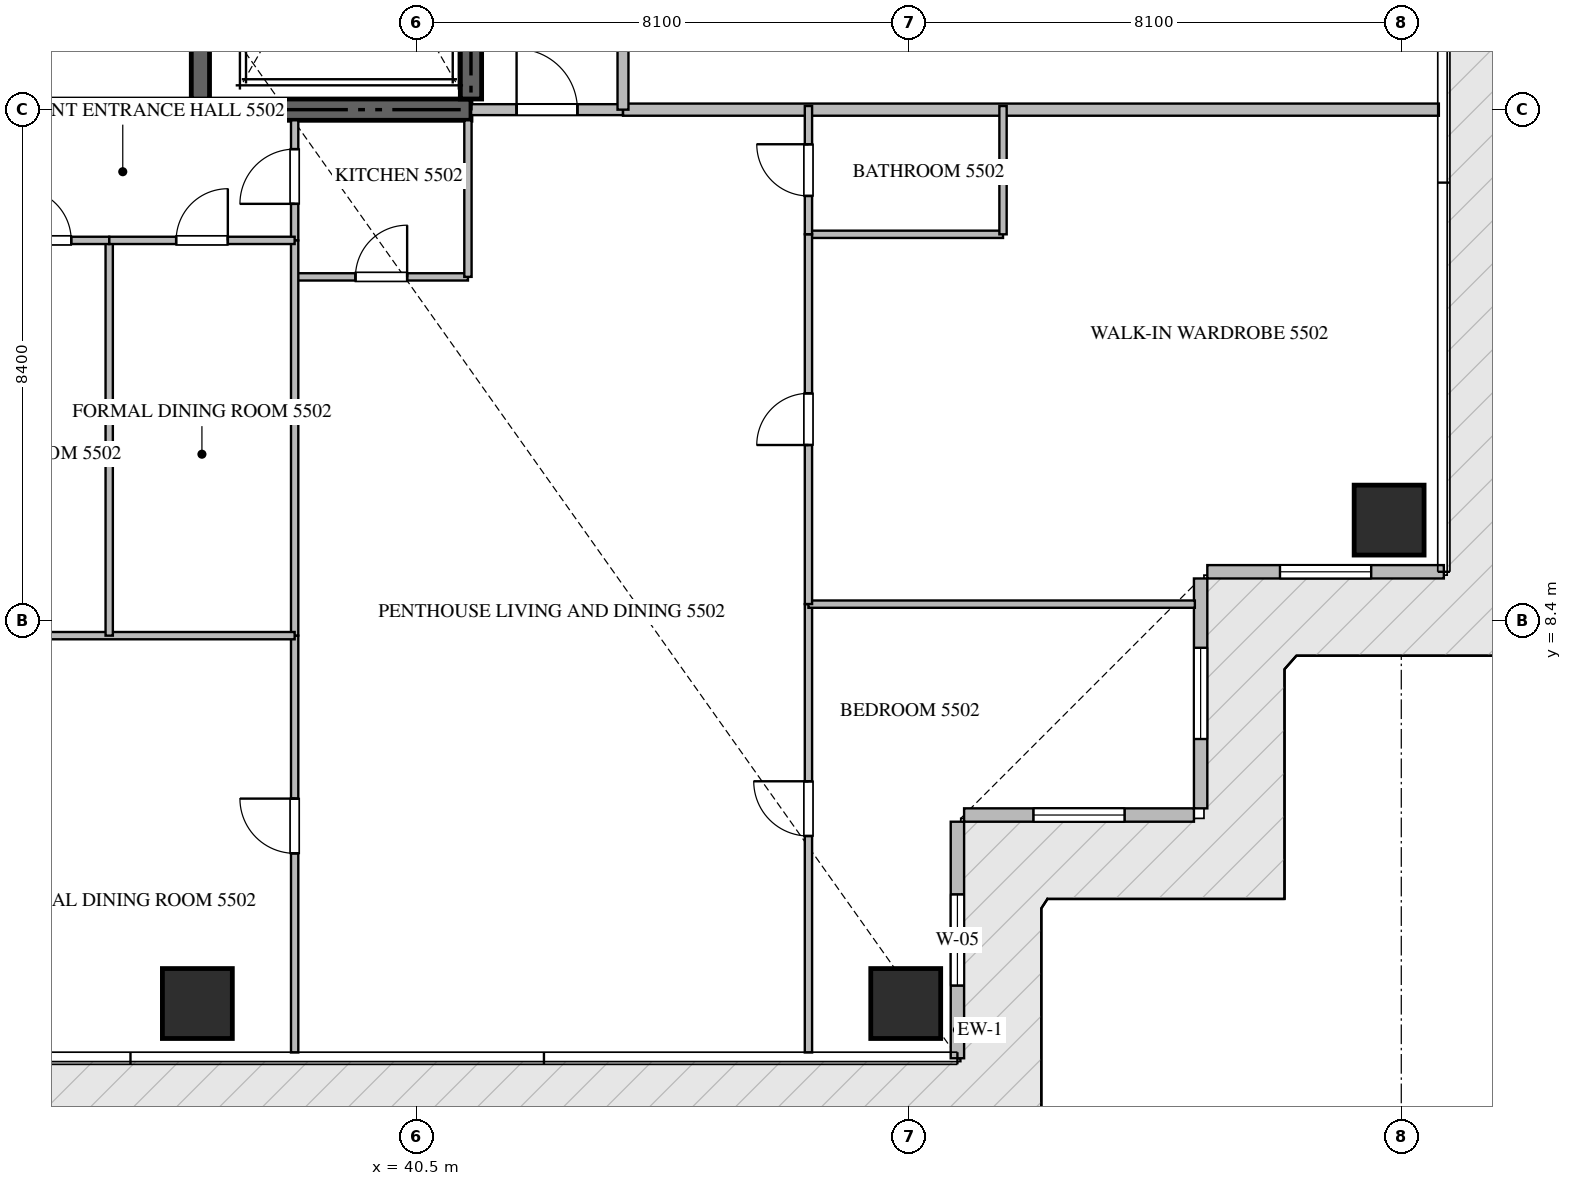
"""IFC4 building model, lengths in metres.
Left out: names, types, materials, properties, quantities, classifications, styles, units other than length and angle.
Written with IfcOpenShell. Run it as: python <this file> out.ifc"""

import sys

from ifc_helpers import new_model, si_unit, direction, frame, frame_2d, origin, origin_2d, place, context, subcontext, project, spatial, rectangle, extrude, source, transform, mapped, element, fill, save


model = new_model("IFC4")
c1 = context("Model", 3, precision=1e-05, world=origin(), true_north=direction((0.0, 1.0)))
c2 = subcontext(c1, "Body", "Model", "MODEL_VIEW")
j1 = project(units=[si_unit("LENGTHUNIT", "METRE"), si_unit("PLANEANGLEUNIT", "RADIAN")], contexts=[c1])
p1 = place(None, origin())
s1 = spatial("IfcSite", under=j1, at=p1, CompositionType="ELEMENT")
p2 = place(p1, origin())
s2 = spatial("IfcBuilding", under=s1, at=p2, CompositionType="ELEMENT")
p3 = place(p2, frame((0.0, 0.0, 222.0)))
s3 = spatial("IfcBuildingStorey", under=s2, at=p3, CompositionType="ELEMENT", Elevation=222.0)
p4 = place(p3, frame((23.4, 16.8, -0.26), z_axis=(0.0, 0.0, 1.0), x_axis=(1.0, 0.0, 0.0)))
e1 = element("IfcWall", 1, at=p4, inside=s3, PredefinedType="SHEAR", context=c2, shape_type="SweptSolid", body=[
    extrude(rectangle(XDim=18.0, YDim=0.35, at=frame_2d((9.0, 0.0))), origin(), (0.0, 0.0, 1.0), 3.848),
])
p5 = place(p3, frame((41.4, 16.975, -0.26), z_axis=(0.0, 0.0, 1.0), x_axis=(0.0, 1.0, 0.0)))
e2 = element("IfcWall", 2, at=p5, inside=s3, PredefinedType="SHEAR", context=c2, shape_type="SweptSolid", body=[
    extrude(rectangle(XDim=8.375, YDim=0.35, at=frame_2d((4.188, 0.0))), origin(), (0.0, 0.0, 1.0), 3.848),
])
p6 = place(p3, frame((36.95, 16.975, -0.26), z_axis=(0.0, 0.0, 1.0), x_axis=(0.0, 1.0, 0.0)))
e3 = element("IfcWall", 3, at=p6, inside=s3, PredefinedType="SHEAR", context=c2, shape_type="SweptSolid", body=[
    extrude(rectangle(XDim=8.375, YDim=0.3, at=frame_2d((4.188, 0.0))), origin(), (0.0, 0.0, 1.0), 3.848),
])
m1 = source(origin(), c2, "Body", "SweptSolid", [
    extrude(rectangle(XDim=1.15, YDim=1.15, at=origin_2d()), origin(), (0.0, 0.0, 1.0), 3.85),
])
for number, where, z_axis, x_axis in (
    (4, (36.9, 2.1, -0.26), (0.0, 0.0, 1.0), (1.0, 0.0, 0.0)),
    (5, (48.55, 2.1, -0.26), (0.0, 0.0, 1.0), (1.0, 0.0, 0.0)),
    (6, (56.5, 10.05, -0.26), (0.0, 0.0, 1.0), (1.0, 0.0, 0.0)),
):
    element("IfcColumn", number, at=place(p3, frame(where, z_axis=z_axis, x_axis=x_axis)), inside=s3, PredefinedType="COLUMN", context=c2, shape_type="MappedRepresentation", body=[
        mapped(m1, transform((0.0, 0.0, 0.0), scale=1.0)),
    ])
p7 = place(p3, frame((49.4, 1.2, 0.0), z_axis=(0.0, 0.0, 1.0), x_axis=(0.0, 1.0, 0.0)))
e7 = element("IfcWall", 7, at=p7, inside=s3, PredefinedType="ELEMENTEDWALL", context=c2, shape_type="SweptSolid", body=[
    extrude(rectangle(XDim=3.89, YDim=0.22, at=frame_2d((1.945, 0.0))), origin(), (0.0, 0.0, 1.0), 3.575),
])
p8 = place(p7, frame((1.195, 0.0, 0.65)))
e8 = element("IfcOpeningElement", 8, at=p8, cuts=e7, PredefinedType="OPENING", context=c2, shape_type="SweptSolid", body=[
    extrude(rectangle(XDim=1.5, YDim=2.25, at=frame_2d((0.75, 1.125))), frame((0.0, 0.12, 0.0), z_axis=(0.0, -1.0, 0.0), x_axis=(1.0, 0.0, 0.0)), (0.0, 0.0, 1.0), 0.24),
])
p9 = place(p3, frame((49.51, 5.2, 0.0), z_axis=(0.0, 0.0, 1.0), x_axis=(1.0, 0.0, 0.0)))
e9 = element("IfcWall", 9, at=p9, inside=s3, PredefinedType="ELEMENTEDWALL", context=c2, shape_type="SweptSolid", body=[
    extrude(rectangle(XDim=3.78, YDim=0.22, at=frame_2d((1.89, 0.0))), origin(), (0.0, 0.0, 1.0), 3.575),
])
p10 = place(p9, frame((1.14, 0.0, 0.65)))
e10 = element("IfcOpeningElement", 10, at=p10, cuts=e9, PredefinedType="OPENING", context=c2, shape_type="SweptSolid", body=[
    extrude(rectangle(XDim=1.5, YDim=2.25, at=frame_2d((0.75, 1.125))), frame((0.0, 0.12, 0.0), z_axis=(0.0, -1.0, 0.0), x_axis=(1.0, 0.0, 0.0)), (0.0, 0.0, 1.0), 0.24),
])
p11 = place(p3, frame((53.4, 5.31, 0.0), z_axis=(0.0, 0.0, 1.0), x_axis=(0.0, 1.0, 0.0)))
e11 = element("IfcWall", 11, at=p11, inside=s3, PredefinedType="ELEMENTEDWALL", context=c2, shape_type="SweptSolid", body=[
    extrude(rectangle(XDim=3.78, YDim=0.22, at=frame_2d((1.89, 0.0))), origin(), (0.0, 0.0, 1.0), 3.575),
])
p12 = place(p11, frame((1.14, 0.0, 0.65)))
e12 = element("IfcOpeningElement", 12, at=p12, cuts=e11, PredefinedType="OPENING", context=c2, shape_type="SweptSolid", body=[
    extrude(rectangle(XDim=1.5, YDim=2.25, at=frame_2d((0.75, 1.125))), frame((0.0, 0.12, 0.0), z_axis=(0.0, -1.0, 0.0), x_axis=(1.0, 0.0, 0.0)), (0.0, 0.0, 1.0), 0.24),
])
p13 = place(p3, frame((53.51, 9.2, 0.0), z_axis=(0.0, 0.0, 1.0), x_axis=(1.0, 0.0, 0.0)))
e13 = element("IfcWall", 13, at=p13, inside=s3, PredefinedType="ELEMENTEDWALL", context=c2, shape_type="SweptSolid", body=[
    extrude(rectangle(XDim=3.89, YDim=0.22, at=frame_2d((1.945, 0.0))), origin(), (0.0, 0.0, 1.0), 3.575),
])
p14 = place(p13, frame((1.195, 0.0, 0.65)))
e14 = element("IfcOpeningElement", 14, at=p14, cuts=e13, PredefinedType="OPENING", context=c2, shape_type="SweptSolid", body=[
    extrude(rectangle(XDim=1.5, YDim=2.25, at=frame_2d((0.75, 1.125))), frame((0.0, 0.12, 0.0), z_axis=(0.0, -1.0, 0.0), x_axis=(1.0, 0.0, 0.0)), (0.0, 0.0, 1.0), 0.24),
])
p15 = place(p3, frame((43.9, 16.8, 0.0), z_axis=(0.0, 0.0, 1.0), x_axis=(1.0, 0.0, 0.0)))
e15 = element("IfcWall", 15, at=p15, inside=s3, PredefinedType="PARTITIONING", context=c2, shape_type="SweptSolid", body=[
    extrude(rectangle(XDim=13.418, YDim=0.2, at=frame_2d((6.709, 0.0))), origin(), (0.0, 0.0, 1.0), 3.59),
])
p16 = place(p3, frame((41.402, 16.8, 0.0), z_axis=(0.0, 0.0, 1.0), x_axis=(1.0, 0.0, 0.0)))
e16 = element("IfcWall", 16, at=p16, inside=s3, PredefinedType="PARTITIONING", context=c2, shape_type="SweptSolid", body=[
    extrude(rectangle(XDim=2.496, YDim=0.18, at=frame_2d((1.248, 0.0))), origin(), (0.0, 0.0, 1.0), 3.59),
])
p17 = place(p16, frame((0.748, 0.0, 0.0)))
e17 = element("IfcOpeningElement", 17, at=p17, cuts=e16, PredefinedType="OPENING", context=c2, shape_type="SweptSolid", body=[
    extrude(rectangle(XDim=1.0, YDim=2.15, at=frame_2d((0.5, 1.075))), frame((0.0, 0.1, 0.0), z_axis=(0.0, -1.0, 0.0), x_axis=(1.0, 0.0, 0.0)), (0.0, 0.0, 1.0), 0.2),
])
p18 = place(p3, frame((43.9, 16.8, 0.0), z_axis=(0.0, 0.0, 1.0), x_axis=(0.0, 1.0, 0.0)))
e18 = element("IfcWall", 18, at=p18, inside=s3, PredefinedType="PARTITIONING", context=c2, shape_type="SweptSolid", body=[
    extrude(rectangle(XDim=16.8, YDim=0.18, at=frame_2d((8.4, 0.0))), origin(), (0.0, 0.0, 1.0), 3.59),
])
p19 = place(p18, frame((2.575, 0.0, 0.0)))
e19 = element("IfcOpeningElement", 19, at=p19, cuts=e18, PredefinedType="OPENING", context=c2, shape_type="SweptSolid", body=[
    extrude(rectangle(XDim=1.0, YDim=2.15, at=frame_2d((0.5, 1.075))), frame((0.0, 0.1, 0.0), z_axis=(0.0, -1.0, 0.0), x_axis=(1.0, 0.0, 0.0)), (0.0, 0.0, 1.0), 0.2),
])
p20 = place(p18, frame((10.997, 0.0, 0.0)))
e20 = element("IfcOpeningElement", 20, at=p20, cuts=e18, PredefinedType="OPENING", context=c2, shape_type="SweptSolid", body=[
    extrude(rectangle(XDim=1.0, YDim=2.15, at=frame_2d((0.5, 1.075))), frame((0.0, 0.1, 0.0), z_axis=(0.0, -1.0, 0.0), x_axis=(1.0, 0.0, 0.0)), (0.0, 0.0, 1.0), 0.2),
])
p21 = place(p3, frame((38.5, 14.05, 0.0), z_axis=(0.0, 0.0, 1.0), x_axis=(1.0, 0.0, 0.0)))
e21 = element("IfcWall", 21, at=p21, inside=s3, PredefinedType="PARTITIONING", context=c2, shape_type="SweptSolid", body=[
    extrude(rectangle(XDim=2.85, YDim=0.12, at=frame_2d((1.425, 0.0))), origin(), (0.0, 0.0, 1.0), 3.59),
])
p22 = place(p21, frame((1.0, 0.0, 0.0)))
e22 = element("IfcOpeningElement", 22, at=p22, cuts=e21, PredefinedType="OPENING", context=c2, shape_type="SweptSolid", body=[
    extrude(rectangle(XDim=0.85, YDim=2.1, at=frame_2d((0.425, 1.05))), frame((0.0, 0.07, 0.0), z_axis=(0.0, -1.0, 0.0), x_axis=(1.0, 0.0, 0.0)), (0.0, 0.0, 1.0), 0.14),
])
p23 = place(p3, frame((41.35, 14.05, 0.0), z_axis=(0.0, 0.0, 1.0), x_axis=(0.0, 1.0, 0.0)))
e23 = element("IfcWall", 23, at=p23, inside=s3, PredefinedType="PARTITIONING", context=c2, shape_type="SweptSolid", body=[
    extrude(rectangle(XDim=2.575, YDim=0.12, at=frame_2d((1.288, 0.0))), origin(), (0.0, 0.0, 1.0), 3.59),
])
p24 = place(p3, frame((38.5, 14.65, 0.0), z_axis=(0.0, 0.0, 1.0), x_axis=(0.0, 1.0, 0.0)))
e24 = element("IfcWall", 24, at=p24, inside=s3, PredefinedType="PARTITIONING", context=c2, shape_type="SweptSolid", body=[
    extrude(rectangle(XDim=1.975, YDim=0.12, at=frame_2d((0.988, 0.0))), origin(), (0.0, 0.0, 1.0), 3.59),
])
p25 = place(p24, frame((0.601, 0.0, 0.0)))
e25 = element("IfcOpeningElement", 25, at=p25, cuts=e24, PredefinedType="OPENING", context=c2, shape_type="SweptSolid", body=[
    extrude(rectangle(XDim=0.9, YDim=2.1, at=frame_2d((0.45, 1.05))), frame((0.0, 0.07, 0.0), z_axis=(0.0, -1.0, 0.0), x_axis=(1.0, 0.0, 0.0)), (0.0, 0.0, 1.0), 0.14),
])
p26 = place(p3, frame((38.5, 1.295, 0.0), z_axis=(0.0, 0.0, 1.0), x_axis=(0.0, 1.0, 0.0)))
e26 = element("IfcWall", 26, at=p26, inside=s3, PredefinedType="PARTITIONING", context=c2, shape_type="SweptSolid", body=[
    extrude(rectangle(XDim=6.855, YDim=0.12, at=frame_2d((3.427, 0.0))), origin(), (0.0, 0.0, 1.0), 3.59),
])
p27 = place(p26, frame((3.275, 0.0, 0.0)))
e27 = element("IfcOpeningElement", 27, at=p27, cuts=e26, PredefinedType="OPENING", context=c2, shape_type="SweptSolid", body=[
    extrude(rectangle(XDim=0.9, YDim=2.1, at=frame_2d((0.45, 1.05))), frame((0.0, 0.07, 0.0), z_axis=(0.0, -1.0, 0.0), x_axis=(1.0, 0.0, 0.0)), (0.0, 0.0, 1.0), 0.14),
])
p28 = place(p3, frame((38.5, 8.152, 0.0), z_axis=(0.0, 0.0, 1.0), x_axis=(0.0, 1.0, 0.0)))
e28 = element("IfcWall", 28, at=p28, inside=s3, PredefinedType="PARTITIONING", context=c2, shape_type="SweptSolid", body=[
    extrude(rectangle(XDim=6.496, YDim=0.12, at=frame_2d((3.248, 0.0))), origin(), (0.0, 0.0, 1.0), 3.59),
])
p29 = place(p3, frame((33.35, 8.15, 0.0), z_axis=(0.0, 0.0, 1.0), x_axis=(1.0, 0.0, 0.0)))
e29 = element("IfcWall", 29, at=p29, inside=s3, PredefinedType="PARTITIONING", context=c2, shape_type="SweptSolid", body=[
    extrude(rectangle(XDim=5.15, YDim=0.12, at=frame_2d((2.575, 0.0))), origin(), (0.0, 0.0, 1.0), 3.59),
])
p30 = place(p3, frame((35.45, 8.15, 0.0), z_axis=(0.0, 0.0, 1.0), x_axis=(0.0, 1.0, 0.0)))
e30 = element("IfcWall", 30, at=p30, inside=s3, PredefinedType="PARTITIONING", context=c2, shape_type="SweptSolid", body=[
    extrude(rectangle(XDim=6.5, YDim=0.12, at=frame_2d((3.25, 0.0))), origin(), (0.0, 0.0, 1.0), 3.59),
])
p31 = place(p3, frame((33.35, 14.65, 0.0), z_axis=(0.0, 0.0, 1.0), x_axis=(1.0, 0.0, 0.0)))
e31 = element("IfcWall", 31, at=p31, inside=s3, PredefinedType="PARTITIONING", context=c2, shape_type="SweptSolid", body=[
    extrude(rectangle(XDim=2.1, YDim=0.12, at=frame_2d((1.05, 0.0))), origin(), (0.0, 0.0, 1.0), 3.59),
])
p32 = place(p31, frame((0.625, 0.0, 0.0)))
e32 = element("IfcOpeningElement", 32, at=p32, cuts=e31, PredefinedType="OPENING", context=c2, shape_type="SweptSolid", body=[
    extrude(rectangle(XDim=0.85, YDim=2.1, at=frame_2d((0.425, 1.05))), frame((0.0, 0.07, 0.0), z_axis=(0.0, -1.0, 0.0), x_axis=(1.0, 0.0, 0.0)), (0.0, 0.0, 1.0), 0.14),
])
p33 = place(p3, frame((35.452, 14.65, 0.0), z_axis=(0.0, 0.0, 1.0), x_axis=(1.0, 0.0, 0.0)))
e33 = element("IfcWall", 33, at=p33, inside=s3, PredefinedType="PARTITIONING", context=c2, shape_type="SweptSolid", body=[
    extrude(rectangle(XDim=3.048, YDim=0.12, at=frame_2d((1.524, 0.0))), origin(), (0.0, 0.0, 1.0), 3.59),
])
p34 = place(p33, frame((1.099, 0.0, 0.0)))
e34 = element("IfcOpeningElement", 34, at=p34, cuts=e33, PredefinedType="OPENING", context=c2, shape_type="SweptSolid", body=[
    extrude(rectangle(XDim=0.85, YDim=2.1, at=frame_2d((0.425, 1.05))), frame((0.0, 0.07, 0.0), z_axis=(0.0, -1.0, 0.0), x_axis=(1.0, 0.0, 0.0)), (0.0, 0.0, 1.0), 0.14),
])
p35 = place(p3, frame((46.95, 1.295, 0.0), z_axis=(0.0, 0.0, 1.0), x_axis=(0.0, 1.0, 0.0)))
e35 = element("IfcWall", 35, at=p35, inside=s3, PredefinedType="PARTITIONING", context=c2, shape_type="SweptSolid", body=[
    extrude(rectangle(XDim=7.373, YDim=0.12, at=frame_2d((3.687, 0.0))), origin(), (0.0, 0.0, 1.0), 3.59),
])
p36 = place(p35, frame((3.56, 0.0, 0.0)))
e36 = element("IfcOpeningElement", 36, at=p36, cuts=e35, PredefinedType="OPENING", context=c2, shape_type="SweptSolid", body=[
    extrude(rectangle(XDim=0.9, YDim=2.1, at=frame_2d((0.45, 1.05))), frame((0.0, 0.07, 0.0), z_axis=(0.0, -1.0, 0.0), x_axis=(1.0, 0.0, 0.0)), (0.0, 0.0, 1.0), 0.14),
])
p37 = place(p3, frame((46.95, 8.668, 0.0), z_axis=(0.0, 0.0, 1.0), x_axis=(1.0, 0.0, 0.0)))
e37 = element("IfcWall", 37, at=p37, inside=s3, PredefinedType="PARTITIONING", context=c2, shape_type="SweptSolid", body=[
    extrude(rectangle(XDim=6.355, YDim=0.12, at=frame_2d((3.177, 0.0))), origin(), (0.0, 0.0, 1.0), 3.59),
])
p38 = place(p3, frame((46.95, 14.75, 0.0), z_axis=(0.0, 0.0, 1.0), x_axis=(1.0, 0.0, 0.0)))
e38 = element("IfcWall", 38, at=p38, inside=s3, PredefinedType="PARTITIONING", context=c2, shape_type="SweptSolid", body=[
    extrude(rectangle(XDim=3.2, YDim=0.12, at=frame_2d((1.6, 0.0))), origin(), (0.0, 0.0, 1.0), 3.59),
])
p39 = place(p3, frame((50.15, 14.75, 0.0), z_axis=(0.0, 0.0, 1.0), x_axis=(0.0, 1.0, 0.0)))
e39 = element("IfcWall", 39, at=p39, inside=s3, PredefinedType="PARTITIONING", context=c2, shape_type="SweptSolid", body=[
    extrude(rectangle(XDim=2.11, YDim=0.12, at=frame_2d((1.055, 0.0))), origin(), (0.0, 0.0, 1.0), 3.59),
])
p40 = place(p3, frame((46.95, 8.67, 0.0), z_axis=(0.0, 0.0, 1.0), x_axis=(0.0, 1.0, 0.0)))
e40 = element("IfcWall", 40, at=p40, inside=s3, PredefinedType="PARTITIONING", context=c2, shape_type="SweptSolid", body=[
    extrude(rectangle(XDim=6.08, YDim=0.12, at=frame_2d((3.04, 0.0))), origin(), (0.0, 0.0, 1.0), 3.59),
])
p41 = place(p40, frame((2.615, 0.0, 0.0)))
e41 = element("IfcOpeningElement", 41, at=p41, cuts=e40, PredefinedType="OPENING", context=c2, shape_type="SweptSolid", body=[
    extrude(rectangle(XDim=0.85, YDim=2.1, at=frame_2d((0.425, 1.05))), frame((0.0, 0.07, 0.0), z_axis=(0.0, -1.0, 0.0), x_axis=(1.0, 0.0, 0.0)), (0.0, 0.0, 1.0), 0.14),
])
p42 = place(p3, frame((46.95, 14.752, 0.0), z_axis=(0.0, 0.0, 1.0), x_axis=(0.0, 1.0, 0.0)))
e42 = element("IfcWall", 42, at=p42, inside=s3, PredefinedType="PARTITIONING", context=c2, shape_type="SweptSolid", body=[
    extrude(rectangle(XDim=2.108, YDim=0.12, at=frame_2d((1.054, 0.0))), origin(), (0.0, 0.0, 1.0), 3.59),
])
p43 = place(p42, frame((0.629, 0.0, 0.0)))
e43 = element("IfcOpeningElement", 43, at=p43, cuts=e42, PredefinedType="OPENING", context=c2, shape_type="SweptSolid", body=[
    extrude(rectangle(XDim=0.85, YDim=2.1, at=frame_2d((0.425, 1.05))), frame((0.0, 0.07, 0.0), z_axis=(0.0, -1.0, 0.0), x_axis=(1.0, 0.0, 0.0)), (0.0, 0.0, 1.0), 0.14),
])
m2 = source(origin(), c2, "Body", "SweptSolid", [
    extrude(rectangle(XDim=1.5, YDim=2.25, at=frame_2d((0.75, 1.125))), frame((0.0, 0.03, 0.0), z_axis=(0.0, -1.0, 0.0), x_axis=(1.0, 0.0, 0.0)), (0.0, 0.0, 1.0), 0.06),
])
p44 = place(p8, origin())
e44 = element("IfcWindow", 44, at=p44, inside=s3, PartitioningType="SINGLE_PANEL", PredefinedType="WINDOW", context=c2, shape_type="MappedRepresentation", body=[
    mapped(m2, transform((0.0, 0.0, 0.0), scale=1.0)),
])
fill(e8, e44)
p45 = place(p10, origin())
e45 = element("IfcWindow", 45, at=p45, inside=s3, PartitioningType="SINGLE_PANEL", PredefinedType="WINDOW", context=c2, shape_type="MappedRepresentation", body=[
    mapped(m2, transform((0.0, 0.0, 0.0), scale=1.0)),
])
fill(e10, e45)
p46 = place(p12, origin())
e46 = element("IfcWindow", 46, at=p46, inside=s3, PartitioningType="SINGLE_PANEL", PredefinedType="WINDOW", context=c2, shape_type="MappedRepresentation", body=[
    mapped(m2, transform((0.0, 0.0, 0.0), scale=1.0)),
])
fill(e12, e46)
p47 = place(p14, origin())
e47 = element("IfcWindow", 47, at=p47, inside=s3, PartitioningType="SINGLE_PANEL", PredefinedType="WINDOW", context=c2, shape_type="MappedRepresentation", body=[
    mapped(m2, transform((0.0, 0.0, 0.0), scale=1.0)),
])
fill(e14, e47)
m3 = source(origin(), c2, "Body", "SweptSolid", [
    extrude(rectangle(XDim=1.0, YDim=2.15, at=frame_2d((0.5, 1.075))), frame((0.0, 0.025, 0.0), z_axis=(0.0, -1.0, 0.0), x_axis=(1.0, 0.0, 0.0)), (0.0, 0.0, 1.0), 0.05),
])
p48 = place(p17, origin())
e48 = element("IfcDoor", 48, at=p48, inside=s3, OperationType="SINGLE_SWING_LEFT", PredefinedType="DOOR", context=c2, shape_type="MappedRepresentation", body=[
    mapped(m3, transform((0.0, 0.0, 0.0), scale=1.0)),
])
fill(e17, e48)
m4 = source(origin(), c2, "Body", "SweptSolid", [
    extrude(rectangle(XDim=0.85, YDim=2.1, at=frame_2d((0.425, 1.05))), frame((0.0, 0.025, 0.0), z_axis=(0.0, -1.0, 0.0), x_axis=(1.0, 0.0, 0.0)), (0.0, 0.0, 1.0), 0.05),
])
p49 = place(p22, origin())
e49 = element("IfcDoor", 49, at=p49, inside=s3, OperationType="SINGLE_SWING_RIGHT", PredefinedType="DOOR", context=c2, shape_type="MappedRepresentation", body=[
    mapped(m4, transform((0.0, 0.0, 0.0), scale=1.0)),
])
fill(e22, e49)
m5 = source(origin(), c2, "Body", "SweptSolid", [
    extrude(rectangle(XDim=0.9, YDim=2.1, at=frame_2d((0.45, 1.05))), frame((0.0, 0.025, 0.0), z_axis=(0.0, -1.0, 0.0), x_axis=(1.0, 0.0, 0.0)), (0.0, 0.0, 1.0), 0.05),
])
p50 = place(p25, origin())
e50 = element("IfcDoor", 50, at=p50, inside=s3, OperationType="SINGLE_SWING_LEFT", PredefinedType="DOOR", context=c2, shape_type="MappedRepresentation", body=[
    mapped(m5, transform((0.0, 0.0, 0.0), scale=1.0)),
])
fill(e25, e50)
p51 = place(p27, origin())
e51 = element("IfcDoor", 51, at=p51, inside=s3, OperationType="SINGLE_SWING_RIGHT", PredefinedType="DOOR", context=c2, shape_type="MappedRepresentation", body=[
    mapped(m5, transform((0.0, 0.0, 0.0), scale=1.0)),
])
fill(e27, e51)
p52 = place(p32, origin())
e52 = element("IfcDoor", 52, at=p52, inside=s3, OperationType="SINGLE_SWING_LEFT", PredefinedType="DOOR", context=c2, shape_type="MappedRepresentation", body=[
    mapped(m4, transform((0.0, 0.0, 0.0), scale=1.0)),
])
fill(e32, e52)
p53 = place(p34, origin())
e53 = element("IfcDoor", 53, at=p53, inside=s3, OperationType="SINGLE_SWING_RIGHT", PredefinedType="DOOR", context=c2, shape_type="MappedRepresentation", body=[
    mapped(m4, transform((0.0, 0.0, 0.0), scale=1.0)),
])
fill(e34, e53)
p54 = place(p36, origin())
e54 = element("IfcDoor", 54, at=p54, inside=s3, OperationType="SINGLE_SWING_RIGHT", PredefinedType="DOOR", context=c2, shape_type="MappedRepresentation", body=[
    mapped(m5, transform((0.0, 0.0, 0.0), scale=1.0)),
])
fill(e36, e54)
p55 = place(p41, origin())
e55 = element("IfcDoor", 55, at=p55, inside=s3, OperationType="SINGLE_SWING_LEFT", PredefinedType="DOOR", context=c2, shape_type="MappedRepresentation", body=[
    mapped(m4, transform((0.0, 0.0, 0.0), scale=1.0)),
])
fill(e41, e55)
p56 = place(p43, origin())
e56 = element("IfcDoor", 56, at=p56, inside=s3, OperationType="SINGLE_SWING_RIGHT", PredefinedType="DOOR", context=c2, shape_type="MappedRepresentation", body=[
    mapped(m4, transform((0.0, 0.0, 0.0), scale=1.0)),
])
fill(e43, e56)
save(model, sys.argv[1])
